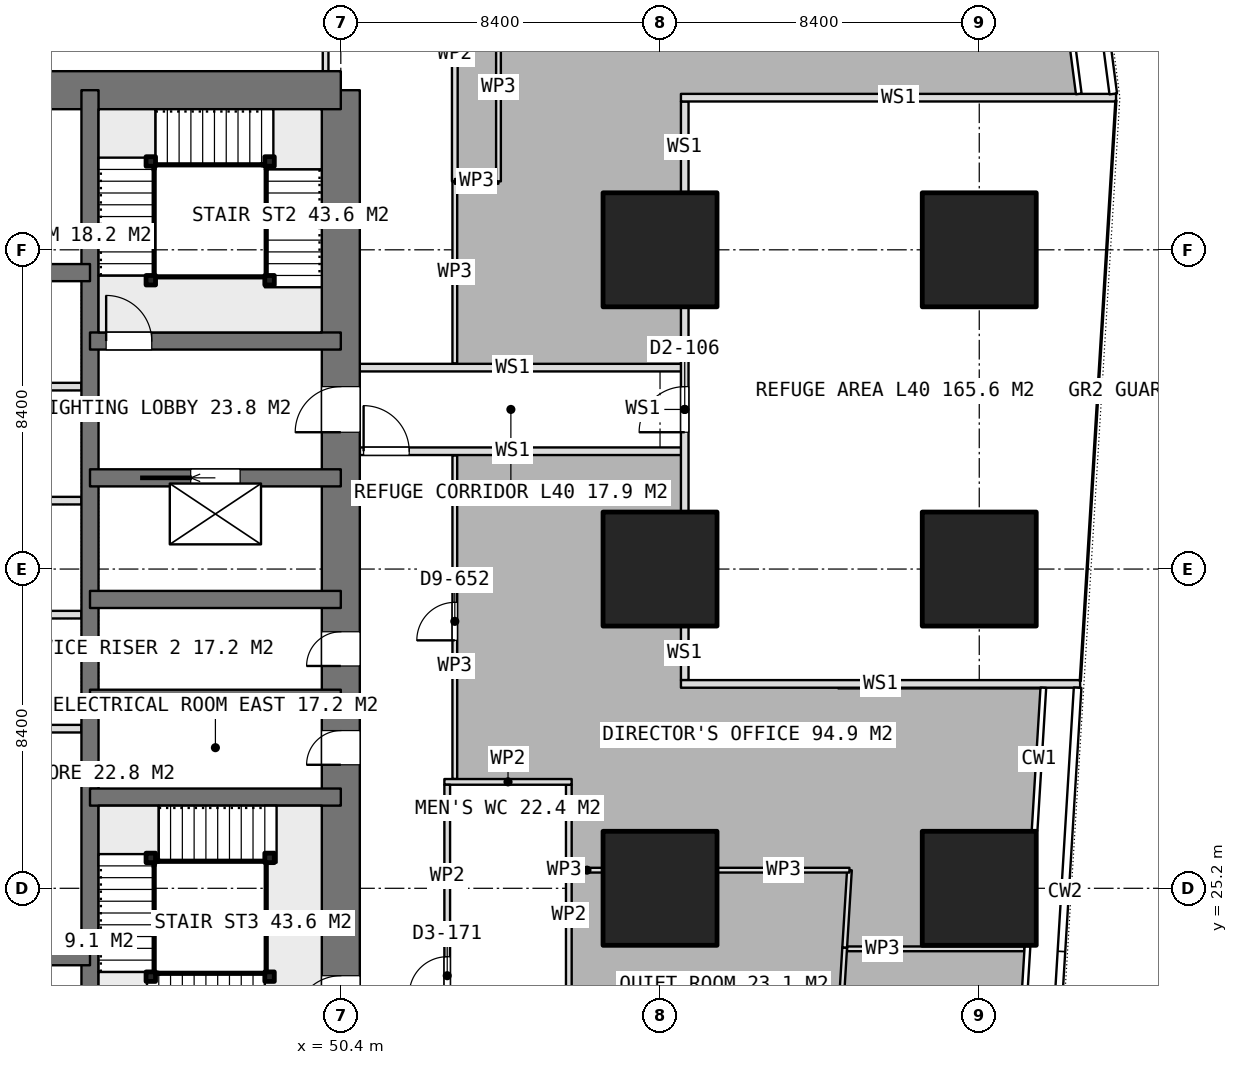
"""IFC4 building model, lengths in metres.
Left out: names, types, materials, properties, quantities, classifications, styles, units other than length and angle.
Written with IfcOpenShell. Run it as: python <this file> out.ifc"""

import sys

from ifc_helpers import new_model, si_unit, direction, frame, frame_2d, origin, origin_2d, place, context, subcontext, project, spatial, rectangle, extrude, element, fill, save


model = new_model("IFC4")
c1 = context("Model", 3, precision=1e-05, world=origin(), true_north=direction((0.0, 1.0)))
c2 = subcontext(c1, "Body", "Model", "MODEL_VIEW")
j1 = project(units=[si_unit("LENGTHUNIT", "METRE"), si_unit("PLANEANGLEUNIT", "RADIAN")], contexts=[c1])
p1 = place(None, origin())
s1 = spatial("IfcSite", under=j1, at=p1, CompositionType="ELEMENT")
p2 = place(p1, origin())
s2 = spatial("IfcBuilding", under=s1, at=p2, CompositionType="ELEMENT")
p3 = place(p2, frame((0.0, 0.0, 159.05)))
s3 = spatial("IfcBuildingStorey", under=s2, at=p3, CompositionType="ELEMENT", Elevation=159.05)
p4 = place(p3, frame((40.0, 46.2, 0.0), z_axis=(0.0, 0.0, 1.0), x_axis=(1.0, 0.0, 0.0)))
e1 = element("IfcWall", 1, at=p4, inside=s3, PredefinedType="SHEAR", context=c2, shape_type="SweptSolid", body=[
    extrude(rectangle(XDim=10.4, YDim=1.0, at=frame_2d((5.2, 0.0))), origin(), (0.0, 0.0, 1.0), 3.75),
])
p5 = place(p3, frame((50.4, 21.0, 0.0), z_axis=(0.0, 0.0, 1.0), x_axis=(0.0, 1.0, 0.0)))
e2 = element("IfcWall", 2, at=p5, inside=s3, PredefinedType="SHEAR", context=c2, shape_type="SweptSolid", body=[
    extrude(rectangle(XDim=25.2, YDim=1.0, at=frame_2d((12.6, 0.0))), origin(), (0.0, 0.0, 1.0), 3.75),
])
p6 = place(p5, frame((16.2, 0.0, 0.0)))
e3 = element("IfcOpeningElement", 3, at=p6, cuts=e2, PredefinedType="OPENING", context=c2, shape_type="SweptSolid", body=[
    extrude(rectangle(XDim=1.2, YDim=2.1, at=frame_2d((0.6, 1.05))), frame((0.0, 0.51, 0.0), z_axis=(0.0, -1.0, 0.0), x_axis=(1.0, 0.0, 0.0)), (0.0, 0.0, 1.0), 1.02),
])
p7 = place(p5, frame((10.05, 0.0, 0.0)))
e4 = element("IfcOpeningElement", 4, at=p7, cuts=e2, PredefinedType="OPENING", context=c2, shape_type="SweptSolid", body=[
    extrude(rectangle(XDim=0.9, YDim=2.1, at=frame_2d((0.45, 1.05))), frame((0.0, 0.51, 0.0), z_axis=(0.0, -1.0, 0.0), x_axis=(1.0, 0.0, 0.0)), (0.0, 0.0, 1.0), 1.02),
])
p8 = place(p5, frame((7.45, 0.0, 0.0)))
e5 = element("IfcOpeningElement", 5, at=p8, cuts=e2, PredefinedType="OPENING", context=c2, shape_type="SweptSolid", body=[
    extrude(rectangle(XDim=0.9, YDim=2.1, at=frame_2d((0.45, 1.05))), frame((0.0, 0.51, 0.0), z_axis=(0.0, -1.0, 0.0), x_axis=(1.0, 0.0, 0.0)), (0.0, 0.0, 1.0), 1.02),
])
p9 = place(p5, frame((0.7, 0.0, 0.0)))
e6 = element("IfcOpeningElement", 6, at=p9, cuts=e2, PredefinedType="OPENING", context=c2, shape_type="SweptSolid", body=[
    extrude(rectangle(XDim=1.2, YDim=2.1, at=frame_2d((0.6, 1.05))), frame((0.0, 0.51, 0.0), z_axis=(0.0, -1.0, 0.0), x_axis=(1.0, 0.0, 0.0)), (0.0, 0.0, 1.0), 1.02),
])
p10 = place(p3, frame((43.8, 21.0, 0.0), z_axis=(0.0, 0.0, 1.0), x_axis=(0.0, 1.0, 0.0)))
e7 = element("IfcWall", 7, at=p10, inside=s3, PredefinedType="SHEAR", context=c2, shape_type="SweptSolid", body=[
    extrude(rectangle(XDim=25.2, YDim=0.45, at=frame_2d((12.6, 0.0))), origin(), (0.0, 0.0, 1.0), 3.75),
])
for number, where, z_axis, x_axis in (
    (8, (40.0, 23.4, 0.0), (0.0, 0.0, 1.0), (1.0, 0.0, 0.0)),
    (9, (40.0, 41.4, 0.0), (0.0, 0.0, 1.0), (1.0, 0.0, 0.0)),
):
    element("IfcWall", number, at=place(p3, frame(where, z_axis=z_axis, x_axis=x_axis)), inside=s3, PredefinedType="SHEAR", context=c2, shape_type="SweptSolid", body=[
        extrude(rectangle(XDim=3.8, YDim=0.45, at=frame_2d((1.9, 0.0))), origin(), (0.0, 0.0, 1.0), 3.75),
    ])
for number, where, z_axis, x_axis in (
    (10, (43.8, 27.6, 0.0), (0.0, 0.0, 1.0), (1.0, 0.0, 0.0)),
    (11, (43.8, 30.2, 0.0), (0.0, 0.0, 1.0), (1.0, 0.0, 0.0)),
    (12, (43.8, 32.8, 0.0), (0.0, 0.0, 1.0), (1.0, 0.0, 0.0)),
):
    element("IfcWall", number, at=place(p3, frame(where, z_axis=z_axis, x_axis=x_axis)), inside=s3, PredefinedType="SHEAR", context=c2, shape_type="SweptSolid", body=[
        extrude(rectangle(XDim=6.6, YDim=0.45, at=frame_2d((3.3, 0.0))), origin(), (0.0, 0.0, 1.0), 3.75),
    ])
p11 = place(p3, frame((43.8, 36.0, 0.0), z_axis=(0.0, 0.0, 1.0), x_axis=(1.0, 0.0, 0.0)))
e13 = element("IfcWall", 13, at=p11, inside=s3, PredefinedType="SHEAR", context=c2, shape_type="SweptSolid", body=[
    extrude(rectangle(XDim=6.6, YDim=0.45, at=frame_2d((3.3, 0.0))), origin(), (0.0, 0.0, 1.0), 3.75),
])
p12 = place(p11, frame((2.65, 0.0, 0.0)))
e14 = element("IfcOpeningElement", 14, at=p12, cuts=e13, PredefinedType="OPENING", context=c2, shape_type="SweptSolid", body=[
    extrude(rectangle(XDim=1.3, YDim=2.1, at=frame_2d((0.65, 1.05))), frame((0.0, 0.235, 0.0), z_axis=(0.0, -1.0, 0.0), x_axis=(1.0, 0.0, 0.0)), (0.0, 0.0, 1.0), 0.47),
])
p13 = place(p3, frame((43.8, 39.6, 0.0), z_axis=(0.0, 0.0, 1.0), x_axis=(1.0, 0.0, 0.0)))
e15 = element("IfcWall", 15, at=p13, inside=s3, PredefinedType="SHEAR", context=c2, shape_type="SweptSolid", body=[
    extrude(rectangle(XDim=6.6, YDim=0.45, at=frame_2d((3.3, 0.0))), origin(), (0.0, 0.0, 1.0), 3.75),
])
p14 = place(p13, frame((0.425, 0.0, 0.0)))
e16 = element("IfcOpeningElement", 16, at=p14, cuts=e15, PredefinedType="OPENING", context=c2, shape_type="SweptSolid", body=[
    extrude(rectangle(XDim=1.2, YDim=2.1, at=frame_2d((0.6, 1.05))), frame((0.0, 0.235, 0.0), z_axis=(0.0, -1.0, 0.0), x_axis=(1.0, 0.0, 0.0)), (0.0, 0.0, 1.0), 0.47),
])
for number, where, z_axis, x_axis in (
    (17, (58.8, 25.2, 0.0), (0.0, 0.0, 1.0), (1.0, 0.0, 0.0)),
    (18, (58.8, 33.6, 0.0), (0.0, 0.0, 1.0), (1.0, 0.0, 0.0)),
    (19, (58.8, 42.0, 0.0), (0.0, 0.0, 1.0), (1.0, 0.0, 0.0)),
    (20, (67.2, 25.2, 0.0), (0.0, 0.0, 1.0), (1.0, 0.0, 0.0)),
    (21, (67.2, 33.6, 0.0), (0.0, 0.0, 1.0), (1.0, 0.0, 0.0)),
    (22, (67.2, 42.0, 0.0), (0.0, 0.0, 1.0), (1.0, 0.0, 0.0)),
):
    element("IfcColumn", number, at=place(p3, frame(where, z_axis=z_axis, x_axis=x_axis)), inside=s3, PredefinedType="COLUMN", context=c2, shape_type="SweptSolid", body=[
        extrude(rectangle(XDim=3.0, YDim=3.0, at=origin_2d()), origin(), (0.0, 0.0, 1.0), 3.75),
    ])
for number, where, z_axis, x_axis in (
    (23, (40.5, 29.4, 0.0), (0.0, 0.0, 1.0), (1.0, 0.0, 0.0)),
    (24, (40.5, 32.4, 0.0), (0.0, 0.0, 1.0), (1.0, 0.0, 0.0)),
    (25, (40.5, 35.4, 0.0), (0.0, 0.0, 1.0), (1.0, 0.0, 0.0)),
    (26, (40.5, 38.4, 0.0), (0.0, 0.0, 1.0), (1.0, 0.0, 0.0)),
):
    element("IfcWall", number, at=place(p3, frame(where, z_axis=z_axis, x_axis=x_axis)), inside=s3, PredefinedType="PARTITIONING", context=c2, shape_type="SweptSolid", body=[
        extrude(rectangle(XDim=3.075, YDim=0.2, at=frame_2d((1.538, 0.0))), origin(), (0.0, 0.0, 1.0), 3.4),
    ])
p15 = place(p3, frame((50.0, 46.7, 0.0), z_axis=(0.0, 0.0, 1.0), x_axis=(0.0, 1.0, 0.0)))
e27 = element("IfcWall", 27, at=p15, inside=s3, PredefinedType="PARTITIONING", context=c2, shape_type="SweptSolid", body=[
    extrude(rectangle(XDim=2.625, YDim=0.15, at=frame_2d((1.312, 0.0))), origin(), (0.0, 0.0, 1.0), 3.4),
])
p16 = place(p3, frame((53.125, 28.0, 0.0), z_axis=(0.0, 0.0, 1.0), x_axis=(1.0, 0.0, 0.0)))
e28 = element("IfcWall", 28, at=p16, inside=s3, PredefinedType="PARTITIONING", context=c2, shape_type="SweptSolid", body=[
    extrude(rectangle(XDim=3.35, YDim=0.15, at=frame_2d((1.675, 0.0))), origin(), (0.0, 0.0, 1.0), 3.4),
])
p17 = place(p3, frame((53.2, 21.075, 0.0), z_axis=(0.0, 0.0, 1.0), x_axis=(0.0, 1.0, 0.0)))
e29 = element("IfcWall", 29, at=p17, inside=s3, PredefinedType="PARTITIONING", context=c2, shape_type="SweptSolid", body=[
    extrude(rectangle(XDim=6.85, YDim=0.15, at=frame_2d((3.425, 0.0))), origin(), (0.0, 0.0, 1.0), 3.4),
])
p18 = place(p17, frame((1.325, 0.0, 0.0)))
e30 = element("IfcOpeningElement", 30, at=p18, cuts=e29, PredefinedType="OPENING", context=c2, shape_type="SweptSolid", body=[
    extrude(rectangle(XDim=1.0, YDim=2.1, at=frame_2d((0.5, 1.05))), frame((0.0, 0.085, 0.0), z_axis=(0.0, -1.0, 0.0), x_axis=(1.0, 0.0, 0.0)), (0.0, 0.0, 1.0), 0.17),
])
p19 = place(p3, frame((56.4, 21.075, 0.0), z_axis=(0.0, 0.0, 1.0), x_axis=(0.0, 1.0, 0.0)))
e31 = element("IfcWall", 31, at=p19, inside=s3, PredefinedType="PARTITIONING", context=c2, shape_type="SweptSolid", body=[
    extrude(rectangle(XDim=6.85, YDim=0.15, at=frame_2d((3.425, 0.0))), origin(), (0.0, 0.0, 1.0), 3.4),
])
p20 = place(p3, frame((53.4, 39.011, 0.0), z_axis=(0.0, 0.0, 1.0), x_axis=(0.0, 1.0, 0.0)))
e32 = element("IfcWall", 32, at=p20, inside=s3, PredefinedType="PARTITIONING", context=c2, shape_type="SweptSolid", body=[
    extrude(rectangle(XDim=4.79, YDim=0.125, at=frame_2d((2.395, 0.0))), origin(), (0.0, 0.0, 1.0), 3.4),
])
p21 = place(p3, frame((53.4, 43.801, 0.0), z_axis=(0.0, 0.0, 1.0), x_axis=(1.0, 0.0, 0.0)))
e33 = element("IfcWall", 33, at=p21, inside=s3, PredefinedType="PARTITIONING", context=c2, shape_type="SweptSolid", body=[
    extrude(rectangle(XDim=1.149, YDim=0.125, at=frame_2d((0.575, 0.0))), origin(), (0.0, 0.0, 1.0), 3.4),
])
p22 = place(p3, frame((54.549, 43.801, 0.0), z_axis=(0.0, 0.0, 1.0), x_axis=(0.0, 1.0, 0.0)))
e34 = element("IfcWall", 34, at=p22, inside=s3, PredefinedType="PARTITIONING", context=c2, shape_type="SweptSolid", body=[
    extrude(rectangle(XDim=7.103, YDim=0.125, at=frame_2d((3.552, 0.0))), origin(), (0.0, 0.0, 1.0), 3.4),
])
p23 = place(p3, frame((53.4, 43.801, 0.0), z_axis=(0.0, 0.0, 1.0), x_axis=(0.0, 1.0, 0.0)))
e35 = element("IfcWall", 35, at=p23, inside=s3, PredefinedType="PARTITIONING", context=c2, shape_type="SweptSolid", body=[
    extrude(rectangle(XDim=9.599, YDim=0.15, at=frame_2d((4.799, 0.0))), origin(), (0.0, 0.0, 1.0), 3.4),
])
p24 = place(p23, frame((4.299, 0.0, 0.0)))
e36 = element("IfcOpeningElement", 36, at=p24, cuts=e35, PredefinedType="OPENING", context=c2, shape_type="SweptSolid", body=[
    extrude(rectangle(XDim=1.0, YDim=2.1, at=frame_2d((0.5, 1.05))), frame((0.0, 0.085, 0.0), z_axis=(0.0, -1.0, 0.0), x_axis=(1.0, 0.0, 0.0)), (0.0, 0.0, 1.0), 0.17),
])
p25 = place(p3, frame((63.72, 23.607, 0.0), z_axis=(0.0, 0.0, 1.0), x_axis=(1.0, 0.0, 0.0)))
e37 = element("IfcWall", 37, at=p25, inside=s3, PredefinedType="PARTITIONING", context=c2, shape_type="SweptSolid", body=[
    extrude(rectangle(XDim=4.666, YDim=0.125, at=frame_2d((2.333, 0.0))), origin(), (0.0, 0.0, 1.0), 3.4),
])
p26 = place(p3, frame((63.476, 20.65, 0.0), z_axis=(0.0, 0.0, 1.0), x_axis=(0.061018961694, 0.99813660704, 0.0)))
e38 = element("IfcWall", 38, at=p26, inside=s3, PredefinedType="PARTITIONING", context=c2, shape_type="SweptSolid", body=[
    extrude(rectangle(XDim=2.997, YDim=0.125, at=frame_2d((1.499, 0.0))), origin(), (0.0, 0.0, 1.0), 3.4),
])
p27 = place(p3, frame((63.659, 23.642, 0.0), z_axis=(0.0, 0.0, 1.0), x_axis=(0.061312146847, 0.998118640568, 0.0)))
e39 = element("IfcWall", 39, at=p27, inside=s3, PredefinedType="PARTITIONING", context=c2, shape_type="SweptSolid", body=[
    extrude(rectangle(XDim=2.039, YDim=0.125, at=frame_2d((1.02, 0.0))), origin(), (0.0, 0.0, 1.0), 3.4),
])
p28 = place(p3, frame((63.784, 25.677, 0.0), z_axis=(0.0, 0.0, 1.0), x_axis=(-1.0, 0.0, 0.0)))
e40 = element("IfcWall", 40, at=p28, inside=s3, PredefinedType="PARTITIONING", context=c2, shape_type="SweptSolid", body=[
    extrude(rectangle(XDim=3.464, YDim=0.125, at=frame_2d((1.732, 0.0))), origin(), (0.0, 0.0, 1.0), 3.4),
])
p29 = place(p3, frame((57.28, 25.677, 0.0), z_axis=(0.0, 0.0, 1.0), x_axis=(-1.0, 0.0, 0.0)))
e41 = element("IfcWall", 41, at=p29, inside=s3, PredefinedType="PARTITIONING", context=c2, shape_type="SweptSolid", body=[
    extrude(rectangle(XDim=0.805, YDim=0.125, at=frame_2d((0.402, 0.0))), origin(), (0.0, 0.0, 1.0), 3.4),
])
p30 = place(p3, frame((53.4, 28.075, 0.0), z_axis=(0.0, 0.0, 1.0), x_axis=(0.0, 1.0, 0.0)))
e42 = element("IfcWall", 42, at=p30, inside=s3, PredefinedType="PARTITIONING", context=c2, shape_type="SweptSolid", body=[
    extrude(rectangle(XDim=8.514, YDim=0.125, at=frame_2d((4.257, 0.0))), origin(), (0.0, 0.0, 1.0), 3.4),
])
p31 = place(p30, frame((3.649, 0.0, 0.0)))
e43 = element("IfcOpeningElement", 43, at=p31, cuts=e42, PredefinedType="OPENING", context=c2, shape_type="SweptSolid", body=[
    extrude(rectangle(XDim=1.0, YDim=2.1, at=frame_2d((0.5, 1.05))), frame((0.0, 0.073, 0.0), z_axis=(0.0, -1.0, 0.0), x_axis=(1.0, 0.0, 0.0)), (0.0, 0.0, 1.0), 0.145),
])
for number, where, z_axis, x_axis in (
    (44, (45.4, 41.2, 0.0), (0.0, 0.0, 1.0), (1.0, 0.0, 0.0)),
    (45, (45.4, 44.325, 0.0), (0.0, 0.0, 1.0), (1.0, 0.0, 0.0)),
    (46, (48.525, 44.325, 0.0), (0.0, 0.0, 1.0), (1.0, 0.0, 0.0)),
    (47, (48.525, 41.2, 0.0), (0.0, 0.0, 1.0), (1.0, 0.0, 0.0)),
    (48, (48.525, 22.875, 0.0), (0.0, 0.0, 1.0), (1.0, 0.0, 0.0)),
    (49, (45.4, 22.875, 0.0), (0.0, 0.0, 1.0), (1.0, 0.0, 0.0)),
    (50, (45.4, 26.0, 0.0), (0.0, 0.0, 1.0), (1.0, 0.0, 0.0)),
    (51, (48.525, 26.0, 0.0), (0.0, 0.0, 1.0), (1.0, 0.0, 0.0)),
):
    element("IfcColumn", number, at=place(p3, frame(where, z_axis=z_axis, x_axis=x_axis)), inside=s3, PredefinedType="COLUMN", context=c2, shape_type="SweptSolid", body=[
        extrude(rectangle(XDim=0.25, YDim=0.25, at=origin_2d()), origin(), (0.0, 0.0, 1.0), 3.75),
    ])
p32 = place(p3, frame((59.45, 30.678, 0.0), z_axis=(0.0, 0.0, 1.0), x_axis=(0.0, 1.0, 0.0)))
e52 = element("IfcWall", 52, at=p32, inside=s3, PredefinedType="PARTITIONING", context=c2, shape_type="SweptSolid", body=[
    extrude(rectangle(XDim=1.422, YDim=0.2, at=frame_2d((0.711, 0.0))), origin(), (0.0, 0.0, 1.0), 3.4),
])
p33 = place(p3, frame((59.45, 35.1, 0.0), z_axis=(0.0, 0.0, 1.0), x_axis=(0.0, 1.0, 0.0)))
e53 = element("IfcWall", 53, at=p33, inside=s3, PredefinedType="PARTITIONING", context=c2, shape_type="SweptSolid", body=[
    extrude(rectangle(XDim=5.4, YDim=0.2, at=frame_2d((2.7, 0.0))), origin(), (0.0, 0.0, 1.0), 3.4),
])
p34 = place(p33, frame((2.1, 0.0, 0.0)))
e54 = element("IfcOpeningElement", 54, at=p34, cuts=e53, PredefinedType="OPENING", context=c2, shape_type="SweptSolid", body=[
    extrude(rectangle(XDim=1.2, YDim=2.1, at=frame_2d((0.6, 1.05))), frame((0.0, 0.11, 0.0), z_axis=(0.0, -1.0, 0.0), x_axis=(1.0, 0.0, 0.0)), (0.0, 0.0, 1.0), 0.22),
])
p35 = place(p3, frame((59.45, 43.5, 0.0), z_axis=(0.0, 0.0, 1.0), x_axis=(0.0, 1.0, 0.0)))
e55 = element("IfcWall", 55, at=p35, inside=s3, PredefinedType="PARTITIONING", context=c2, shape_type="SweptSolid", body=[
    extrude(rectangle(XDim=2.403, YDim=0.2, at=frame_2d((1.202, 0.0))), origin(), (0.0, 0.0, 1.0), 3.4),
])
p36 = place(p3, frame((59.35, 30.578, 0.0), z_axis=(0.0, 0.0, 1.0), x_axis=(1.0, 0.0, 0.0)))
e56 = element("IfcWall", 56, at=p36, inside=s3, PredefinedType="PARTITIONING", context=c2, shape_type="SweptSolid", body=[
    extrude(rectangle(XDim=10.505, YDim=0.2, at=frame_2d((5.252, 0.0))), origin(), (0.0, 0.0, 1.0), 3.4),
])
p37 = place(p3, frame((59.35, 46.003, 0.0), z_axis=(0.0, 0.0, 1.0), x_axis=(1.0, 0.0, 0.0)))
e57 = element("IfcWall", 57, at=p37, inside=s3, PredefinedType="PARTITIONING", context=c2, shape_type="SweptSolid", body=[
    extrude(rectangle(XDim=11.45, YDim=0.2, at=frame_2d((5.725, 0.0))), origin(), (0.0, 0.0, 1.0), 3.4),
])
p38 = place(p3, frame((50.4, 38.9, 0.0), z_axis=(0.0, 0.0, 1.0), x_axis=(1.0, 0.0, 0.0)))
e58 = element("IfcWall", 58, at=p38, inside=s3, PredefinedType="PARTITIONING", context=c2, shape_type="SweptSolid", body=[
    extrude(rectangle(XDim=9.05, YDim=0.2, at=frame_2d((4.525, 0.0))), origin(), (0.0, 0.0, 1.0), 3.4),
])
p39 = place(p3, frame((50.4, 36.7, 0.0), z_axis=(0.0, 0.0, 1.0), x_axis=(1.0, 0.0, 0.0)))
e59 = element("IfcWall", 59, at=p39, inside=s3, PredefinedType="PARTITIONING", context=c2, shape_type="SweptSolid", body=[
    extrude(rectangle(XDim=9.05, YDim=0.2, at=frame_2d((4.525, 0.0))), origin(), (0.0, 0.0, 1.0), 3.4),
])
p40 = place(p39, frame((0.6, 0.0, 0.0)))
e60 = element("IfcOpeningElement", 60, at=p40, cuts=e59, PredefinedType="OPENING", context=c2, shape_type="SweptSolid", body=[
    extrude(rectangle(XDim=1.2, YDim=2.1, at=frame_2d((0.6, 1.05))), frame((0.0, 0.11, 0.0), z_axis=(0.0, -1.0, 0.0), x_axis=(1.0, 0.0, 0.0)), (0.0, 0.0, 1.0), 0.22),
])
p41 = place(p6, origin())
e61 = element("IfcDoor", 61, at=p41, inside=s3, OperationType="SINGLE_SWING_LEFT", PredefinedType="DOOR", context=c2, shape_type="SweptSolid", body=[
    extrude(rectangle(XDim=1.2, YDim=2.1, at=frame_2d((0.6, 1.05))), frame((0.0, 0.025, 0.0), z_axis=(0.0, -1.0, 0.0), x_axis=(1.0, 0.0, 0.0)), (0.0, 0.0, 1.0), 0.05),
])
fill(e3, e61)
p42 = place(p7, origin())
e62 = element("IfcDoor", 62, at=p42, inside=s3, OperationType="SINGLE_SWING_LEFT", PredefinedType="DOOR", context=c2, shape_type="SweptSolid", body=[
    extrude(rectangle(XDim=0.9, YDim=2.1, at=frame_2d((0.45, 1.05))), frame((0.0, 0.025, 0.0), z_axis=(0.0, -1.0, 0.0), x_axis=(1.0, 0.0, 0.0)), (0.0, 0.0, 1.0), 0.05),
])
fill(e4, e62)
p43 = place(p8, origin())
e63 = element("IfcDoor", 63, at=p43, inside=s3, OperationType="SINGLE_SWING_LEFT", PredefinedType="DOOR", context=c2, shape_type="SweptSolid", body=[
    extrude(rectangle(XDim=0.9, YDim=2.1, at=frame_2d((0.45, 1.05))), frame((0.0, 0.025, 0.0), z_axis=(0.0, -1.0, 0.0), x_axis=(1.0, 0.0, 0.0)), (0.0, 0.0, 1.0), 0.05),
])
fill(e5, e63)
p44 = place(p12, origin())
e64 = element("IfcDoor", 64, at=p44, inside=s3, OperationType="SLIDING_TO_LEFT", PredefinedType="USERDEFINED", context=c2, shape_type="SweptSolid", body=[
    extrude(rectangle(XDim=1.3, YDim=2.1, at=frame_2d((0.65, 1.05))), frame((0.0, 0.025, 0.0), z_axis=(0.0, -1.0, 0.0), x_axis=(1.0, 0.0, 0.0)), (0.0, 0.0, 1.0), 0.05),
])
fill(e14, e64)
p45 = place(p18, origin())
e65 = element("IfcDoor", 65, at=p45, inside=s3, OperationType="SINGLE_SWING_LEFT", PredefinedType="DOOR", context=c2, shape_type="SweptSolid", body=[
    extrude(rectangle(XDim=1.0, YDim=2.1, at=frame_2d((0.5, 1.05))), frame((0.0, 0.025, 0.0), z_axis=(0.0, -1.0, 0.0), x_axis=(1.0, 0.0, 0.0)), (0.0, 0.0, 1.0), 0.05),
])
fill(e30, e65)
p46 = place(p31, origin())
e66 = element("IfcDoor", 66, at=p46, inside=s3, OperationType="SINGLE_SWING_LEFT", PredefinedType="DOOR", context=c2, shape_type="SweptSolid", body=[
    extrude(rectangle(XDim=1.0, YDim=2.1, at=frame_2d((0.5, 1.05))), frame((0.0, 0.025, 0.0), z_axis=(0.0, -1.0, 0.0), x_axis=(1.0, 0.0, 0.0)), (0.0, 0.0, 1.0), 0.05),
])
fill(e43, e66)
p47 = place(p14, origin())
e67 = element("IfcDoor", 67, at=p47, inside=s3, OperationType="SINGLE_SWING_RIGHT", PredefinedType="DOOR", context=c2, shape_type="SweptSolid", body=[
    extrude(rectangle(XDim=1.2, YDim=2.1, at=frame_2d((0.6, 1.05))), frame((0.0, 0.025, 0.0), z_axis=(0.0, -1.0, 0.0), x_axis=(1.0, 0.0, 0.0)), (0.0, 0.0, 1.0), 0.05),
])
fill(e16, e67)
p48 = place(p9, origin())
e68 = element("IfcDoor", 68, at=p48, inside=s3, OperationType="SINGLE_SWING_RIGHT", PredefinedType="DOOR", context=c2, shape_type="SweptSolid", body=[
    extrude(rectangle(XDim=1.2, YDim=2.1, at=frame_2d((0.6, 1.05))), frame((0.0, 0.025, 0.0), z_axis=(0.0, -1.0, 0.0), x_axis=(1.0, 0.0, 0.0)), (0.0, 0.0, 1.0), 0.05),
])
fill(e6, e68)
p49 = place(p34, origin())
e69 = element("IfcDoor", 69, at=p49, inside=s3, OperationType="SINGLE_SWING_LEFT", PredefinedType="DOOR", context=c2, shape_type="SweptSolid", body=[
    extrude(rectangle(XDim=1.2, YDim=2.1, at=frame_2d((0.6, 1.05))), frame((0.0, 0.025, 0.0), z_axis=(0.0, -1.0, 0.0), x_axis=(1.0, 0.0, 0.0)), (0.0, 0.0, 1.0), 0.05),
])
fill(e54, e69)
p50 = place(p40, origin())
e70 = element("IfcDoor", 70, at=p50, inside=s3, OperationType="SINGLE_SWING_LEFT", PredefinedType="DOOR", context=c2, shape_type="SweptSolid", body=[
    extrude(rectangle(XDim=1.2, YDim=2.1, at=frame_2d((0.6, 1.05))), frame((0.0, 0.025, 0.0), z_axis=(0.0, -1.0, 0.0), x_axis=(1.0, 0.0, 0.0)), (0.0, 0.0, 1.0), 0.05),
])
fill(e60, e70)
save(model, sys.argv[1])
